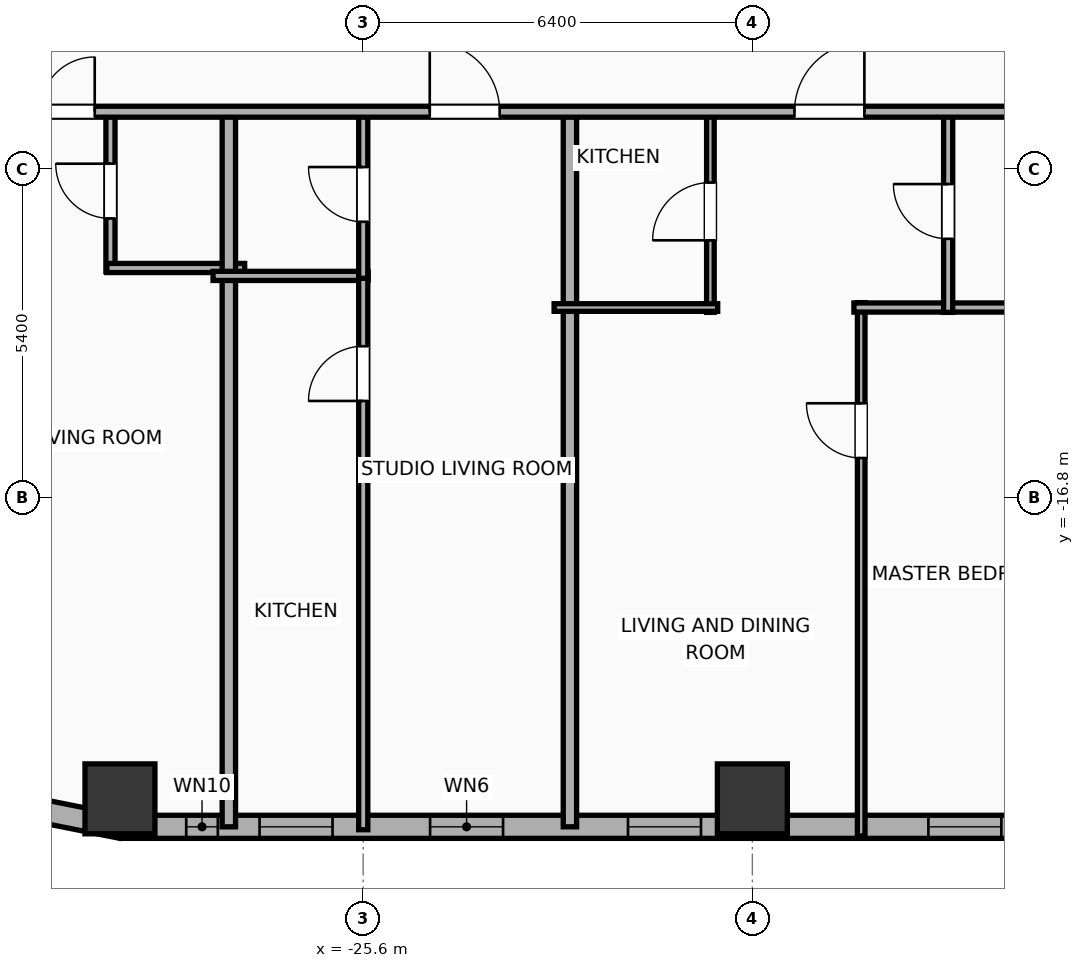
"""IFC4 building model, lengths in metres.
Left out: names, types, materials, properties, quantities, classifications, styles, units other than length and angle.
Written with IfcOpenShell. Run it as: python <this file> out.ifc"""

import sys

from ifc_helpers import new_model, si_unit, direction, frame, frame_2d, origin, origin_2d, place, context, subcontext, project, spatial, rectangle, hollow_rectangle, extrude, element, fill, save


model = new_model("IFC4")
c1 = context("Model", 3, precision=1e-05, world=origin(), true_north=direction((0.0, 1.0)))
c2 = subcontext(c1, "Body", "Model", "MODEL_VIEW")
j1 = project(units=[si_unit("LENGTHUNIT", "METRE"), si_unit("PLANEANGLEUNIT", "RADIAN")], contexts=[c1])
p1 = place(None, origin())
s1 = spatial("IfcSite", under=j1, at=p1, CompositionType="ELEMENT")
p2 = place(p1, origin())
s2 = spatial("IfcBuilding", under=s1, at=p2, CompositionType="ELEMENT")
p3 = place(p2, frame((0.0, 0.0, 72.8)))
s3 = spatial("IfcBuildingStorey", under=s2, at=p3, CompositionType="ELEMENT", Elevation=72.8)
for number, where, z_axis, x_axis in (
    (1, (-29.6, -21.75, 0.0), (0.0, 0.0, 1.0), (1.0, 0.0, 0.0)),
    (2, (-19.2, -21.75, 0.0), (0.0, 0.0, 1.0), (1.0, 0.0, 0.0)),
):
    element("IfcColumn", number, at=place(p3, frame(where, z_axis=z_axis, x_axis=x_axis)), inside=s3, PredefinedType="COLUMN", context=c2, shape_type="SweptSolid", body=[
        extrude(hollow_rectangle(XDim=1.15, YDim=1.15, WallThickness=0.04, at=origin_2d()), origin(), (0.0, 0.0, 1.0), 3.9),
    ])
p4 = place(p3, frame((22.381, -22.21, 0.0), z_axis=(0.0, 0.0, 1.0), x_axis=(-1.0, 0.0, 0.0)))
e3 = element("IfcWall", 3, at=p4, inside=s3, PredefinedType="ELEMENTEDWALL", context=c2, shape_type="SweptSolid", body=[
    extrude(rectangle(XDim=51.963, YDim=0.38, at=frame_2d((25.981, 0.0))), origin(), (0.0, 0.0, 1.0), 3.65),
])
p5 = place(p4, frame((50.372, 0.0, 0.75)))
e4 = element("IfcOpeningElement", 4, at=p5, cuts=e3, PredefinedType="OPENING", context=c2, shape_type="SweptSolid", body=[
    extrude(rectangle(XDim=0.52, YDim=2.05, at=frame_2d((0.26, 1.025))), frame((0.0, 0.2, 0.0), z_axis=(0.0, -1.0, 0.0), x_axis=(1.0, 0.0, 0.0)), (0.0, 0.0, 1.0), 0.4),
])
p6 = place(p4, frame((45.681, 0.0, 0.75)))
e5 = element("IfcOpeningElement", 5, at=p6, cuts=e3, PredefinedType="OPENING", context=c2, shape_type="SweptSolid", body=[
    extrude(rectangle(XDim=1.2, YDim=2.05, at=frame_2d((0.6, 1.025))), frame((0.0, 0.2, 0.0), z_axis=(0.0, -1.0, 0.0), x_axis=(1.0, 0.0, 0.0)), (0.0, 0.0, 1.0), 0.4),
])
p7 = place(p4, frame((48.485, 0.0, 0.75)))
e6 = element("IfcOpeningElement", 6, at=p7, cuts=e3, PredefinedType="OPENING", context=c2, shape_type="SweptSolid", body=[
    extrude(rectangle(XDim=1.2, YDim=2.05, at=frame_2d((0.6, 1.025))), frame((0.0, 0.2, 0.0), z_axis=(0.0, -1.0, 0.0), x_axis=(1.0, 0.0, 0.0)), (0.0, 0.0, 1.0), 0.4),
])
p8 = place(p4, frame((42.426, 0.0, 0.75)))
e7 = element("IfcOpeningElement", 7, at=p8, cuts=e3, PredefinedType="OPENING", context=c2, shape_type="SweptSolid", body=[
    extrude(rectangle(XDim=1.2, YDim=2.05, at=frame_2d((0.6, 1.025))), frame((0.0, 0.2, 0.0), z_axis=(0.0, -1.0, 0.0), x_axis=(1.0, 0.0, 0.0)), (0.0, 0.0, 1.0), 0.4),
])
p9 = place(p4, frame((37.486, 0.0, 0.75)))
e8 = element("IfcOpeningElement", 8, at=p9, cuts=e3, PredefinedType="OPENING", context=c2, shape_type="SweptSolid", body=[
    extrude(rectangle(XDim=1.2, YDim=2.05, at=frame_2d((0.6, 1.025))), frame((0.0, 0.2, 0.0), z_axis=(0.0, -1.0, 0.0), x_axis=(1.0, 0.0, 0.0)), (0.0, 0.0, 1.0), 0.4),
])
p10 = place(p4, frame((33.386, 0.0, 0.75)))
e9 = element("IfcOpeningElement", 9, at=p10, cuts=e3, PredefinedType="OPENING", context=c2, shape_type="SweptSolid", body=[
    extrude(rectangle(XDim=1.2, YDim=2.05, at=frame_2d((0.6, 1.025))), frame((0.0, 0.2, 0.0), z_axis=(0.0, -1.0, 0.0), x_axis=(1.0, 0.0, 0.0)), (0.0, 0.0, 1.0), 0.4),
])
p11 = place(p4, frame((29.166, 0.0, 0.75)))
e10 = element("IfcOpeningElement", 10, at=p11, cuts=e3, PredefinedType="OPENING", context=c2, shape_type="SweptSolid", body=[
    extrude(rectangle(XDim=1.2, YDim=2.05, at=frame_2d((0.6, 1.025))), frame((0.0, 0.2, 0.0), z_axis=(0.0, -1.0, 0.0), x_axis=(1.0, 0.0, 0.0)), (0.0, 0.0, 1.0), 0.4),
])
p12 = place(p4, frame((26.081, 0.0, 0.75)))
e11 = element("IfcOpeningElement", 11, at=p12, cuts=e3, PredefinedType="OPENING", context=c2, shape_type="SweptSolid", body=[
    extrude(rectangle(XDim=1.2, YDim=2.05, at=frame_2d((0.6, 1.025))), frame((0.0, 0.2, 0.0), z_axis=(0.0, -1.0, 0.0), x_axis=(1.0, 0.0, 0.0)), (0.0, 0.0, 1.0), 0.4),
])
p13 = place(p4, frame((21.981, 0.0, 0.75)))
e12 = element("IfcOpeningElement", 12, at=p13, cuts=e3, PredefinedType="OPENING", context=c2, shape_type="SweptSolid", body=[
    extrude(rectangle(XDim=1.2, YDim=2.05, at=frame_2d((0.6, 1.025))), frame((0.0, 0.2, 0.0), z_axis=(0.0, -1.0, 0.0), x_axis=(1.0, 0.0, 0.0)), (0.0, 0.0, 1.0), 0.4),
])
p14 = place(p4, frame((16.986, 0.0, 0.75)))
e13 = element("IfcOpeningElement", 13, at=p14, cuts=e3, PredefinedType="OPENING", context=c2, shape_type="SweptSolid", body=[
    extrude(rectangle(XDim=1.2, YDim=2.05, at=frame_2d((0.6, 1.025))), frame((0.0, 0.2, 0.0), z_axis=(0.0, -1.0, 0.0), x_axis=(1.0, 0.0, 0.0)), (0.0, 0.0, 1.0), 0.4),
])
p15 = place(p4, frame((12.886, 0.0, 0.75)))
e14 = element("IfcOpeningElement", 14, at=p15, cuts=e3, PredefinedType="OPENING", context=c2, shape_type="SweptSolid", body=[
    extrude(rectangle(XDim=1.2, YDim=2.05, at=frame_2d((0.6, 1.025))), frame((0.0, 0.2, 0.0), z_axis=(0.0, -1.0, 0.0), x_axis=(1.0, 0.0, 0.0)), (0.0, 0.0, 1.0), 0.4),
])
p16 = place(p4, frame((8.306, 0.0, 0.75)))
e15 = element("IfcOpeningElement", 15, at=p16, cuts=e3, PredefinedType="OPENING", context=c2, shape_type="SweptSolid", body=[
    extrude(rectangle(XDim=1.2, YDim=2.05, at=frame_2d((0.6, 1.025))), frame((0.0, 0.2, 0.0), z_axis=(0.0, -1.0, 0.0), x_axis=(1.0, 0.0, 0.0)), (0.0, 0.0, 1.0), 0.4),
])
p17 = place(p4, frame((4.686, 0.0, 0.75)))
e16 = element("IfcOpeningElement", 16, at=p17, cuts=e3, PredefinedType="OPENING", context=c2, shape_type="SweptSolid", body=[
    extrude(rectangle(XDim=1.2, YDim=2.05, at=frame_2d((0.6, 1.025))), frame((0.0, 0.2, 0.0), z_axis=(0.0, -1.0, 0.0), x_axis=(1.0, 0.0, 0.0)), (0.0, 0.0, 1.0), 0.4),
])
p18 = place(p4, frame((1.635, 0.0, 0.75)))
e17 = element("IfcOpeningElement", 17, at=p18, cuts=e3, PredefinedType="OPENING", context=c2, shape_type="SweptSolid", body=[
    extrude(rectangle(XDim=1.2, YDim=2.05, at=frame_2d((0.6, 1.025))), frame((0.0, 0.2, 0.0), z_axis=(0.0, -1.0, 0.0), x_axis=(1.0, 0.0, 0.0)), (0.0, 0.0, 1.0), 0.4),
])
p19 = place(p3, frame((-29.581, -22.21, 0.0), z_axis=(0.0, 0.0, 1.0), x_axis=(-0.980786132421, 0.195086038585, 0.0)))
e18 = element("IfcWall", 18, at=p19, inside=s3, PredefinedType="ELEMENTEDWALL", context=c2, shape_type="SweptSolid", body=[
    extrude(rectangle(XDim=1.504, YDim=0.38, at=frame_2d((0.752, 0.0))), origin(), (0.0, 0.0, 1.0), 3.65),
])
p20 = place(p3, frame((-29.756, -13.08, 0.0), z_axis=(0.0, 0.0, 1.0), x_axis=(0.0, 1.0, 0.0)))
e19 = element("IfcWall", 19, at=p20, inside=s3, PredefinedType="PLUMBINGWALL", context=c2, shape_type="SweptSolid", body=[
    extrude(rectangle(XDim=2.65, YDim=0.15, at=frame_2d((1.325, 0.0))), origin(), (0.0, 0.0, 1.0), 3.65),
])
p21 = place(p20, frame((0.875, 0.0, 0.0)))
e20 = element("IfcOpeningElement", 20, at=p21, cuts=e19, PredefinedType="OPENING", context=c2, shape_type="SweptSolid", body=[
    extrude(rectangle(XDim=0.9, YDim=2.05, at=frame_2d((0.45, 1.025))), frame((0.0, 0.085, 0.0), z_axis=(0.0, -1.0, 0.0), x_axis=(1.0, 0.0, 0.0)), (0.0, 0.0, 1.0), 0.17),
])
p22 = place(p3, frame((-29.816, -13.02, 0.0), z_axis=(0.0, 0.0, 1.0), x_axis=(1.0, 0.0, 0.0)))
e21 = element("IfcWall", 21, at=p22, inside=s3, PredefinedType="PLUMBINGWALL", context=c2, shape_type="SweptSolid", body=[
    extrude(rectangle(XDim=2.267, YDim=0.15, at=frame_2d((1.133, 0.0))), origin(), (0.0, 0.0, 1.0), 3.65),
])
p23 = place(p3, frame((-27.809, -22.21, 0.0), z_axis=(0.0, 0.0, 1.0), x_axis=(0.0, 1.0, 0.0)))
e22 = element("IfcWall", 22, at=p23, inside=s3, PredefinedType="PARTITIONING", context=c2, shape_type="SweptSolid", body=[
    extrude(rectangle(XDim=11.84, YDim=0.22, at=frame_2d((5.92, 0.0))), origin(), (0.0, 0.0, 1.0), 3.65),
])
p24 = place(p3, frame((-28.069, -13.15, 0.0), z_axis=(0.0, 0.0, 1.0), x_axis=(1.0, 0.0, 0.0)))
e23 = element("IfcWall", 23, at=p24, inside=s3, PredefinedType="PLUMBINGWALL", context=c2, shape_type="SweptSolid", body=[
    extrude(rectangle(XDim=2.55, YDim=0.15, at=frame_2d((1.275, 0.0))), origin(), (0.0, 0.0, 1.0), 3.65),
])
p25 = place(p3, frame((-25.599, -22.258, 0.0), z_axis=(0.0, 0.0, 1.0), x_axis=(0.0, 1.0, 0.0)))
e24 = element("IfcWall", 24, at=p25, inside=s3, PredefinedType="PLUMBINGWALL", context=c2, shape_type="SweptSolid", body=[
    extrude(rectangle(XDim=9.147, YDim=0.15, at=frame_2d((4.574, 0.0))), origin(), (0.0, 0.0, 1.0), 3.65),
])
p26 = place(p25, frame((7.051, 0.0, 0.0)))
e25 = element("IfcOpeningElement", 25, at=p26, cuts=e24, PredefinedType="OPENING", context=c2, shape_type="SweptSolid", body=[
    extrude(rectangle(XDim=0.9, YDim=2.05, at=frame_2d((0.45, 1.025))), frame((0.0, 0.085, 0.0), z_axis=(0.0, -1.0, 0.0), x_axis=(1.0, 0.0, 0.0)), (0.0, 0.0, 1.0), 0.17),
])
p27 = place(p3, frame((-25.599, -13.19, 0.0), z_axis=(0.0, 0.0, 1.0), x_axis=(0.0, 1.0, 0.0)))
e26 = element("IfcWall", 26, at=p27, inside=s3, PredefinedType="PLUMBINGWALL", context=c2, shape_type="SweptSolid", body=[
    extrude(rectangle(XDim=2.76, YDim=0.15, at=frame_2d((1.38, 0.0))), origin(), (0.0, 0.0, 1.0), 3.65),
])
p28 = place(p27, frame((0.93, 0.0, 0.0)))
e27 = element("IfcOpeningElement", 27, at=p28, cuts=e26, PredefinedType="OPENING", context=c2, shape_type="SweptSolid", body=[
    extrude(rectangle(XDim=0.9, YDim=2.05, at=frame_2d((0.45, 1.025))), frame((0.0, 0.085, 0.0), z_axis=(0.0, -1.0, 0.0), x_axis=(1.0, 0.0, 0.0)), (0.0, 0.0, 1.0), 0.17),
])
p29 = place(p3, frame((-22.2, -22.21, 0.0), z_axis=(0.0, 0.0, 1.0), x_axis=(0.0, 1.0, 0.0)))
e28 = element("IfcWall", 28, at=p29, inside=s3, PredefinedType="PARTITIONING", context=c2, shape_type="SweptSolid", body=[
    extrude(rectangle(XDim=11.84, YDim=0.22, at=frame_2d((5.92, 0.0))), origin(), (0.0, 0.0, 1.0), 3.65),
])
p30 = place(p3, frame((-17.41, -22.36, 0.0), z_axis=(0.0, 0.0, 1.0), x_axis=(0.0, 1.0, 0.0)))
e29 = element("IfcWall", 29, at=p30, inside=s3, PredefinedType="PARTITIONING", context=c2, shape_type="SweptSolid", body=[
    extrude(rectangle(XDim=8.77, YDim=0.125, at=frame_2d((4.385, 0.0))), origin(), (0.0, 0.0, 1.0), 3.65),
])
p31 = place(p30, frame((6.215, 0.0, 0.0)))
e30 = element("IfcOpeningElement", 30, at=p31, cuts=e29, PredefinedType="OPENING", context=c2, shape_type="SweptSolid", body=[
    extrude(rectangle(XDim=0.9, YDim=2.05, at=frame_2d((0.45, 1.025))), frame((0.0, 0.073, 0.0), z_axis=(0.0, -1.0, 0.0), x_axis=(1.0, 0.0, 0.0)), (0.0, 0.0, 1.0), 0.145),
])
p32 = place(p3, frame((-17.53, -13.67, 0.0), z_axis=(0.0, 0.0, 1.0), x_axis=(1.0, 0.0, 0.0)))
e31 = element("IfcWall", 31, at=p32, inside=s3, PredefinedType="PLUMBINGWALL", context=c2, shape_type="SweptSolid", body=[
    extrude(rectangle(XDim=3.605, YDim=0.15, at=frame_2d((1.802, 0.0))), origin(), (0.0, 0.0, 1.0), 3.65),
])
p33 = place(p3, frame((-19.89, -13.75, 0.0), z_axis=(0.0, 0.0, 1.0), x_axis=(0.0, 1.0, 0.0)))
e32 = element("IfcWall", 32, at=p33, inside=s3, PredefinedType="PARTITIONING", context=c2, shape_type="SweptSolid", body=[
    extrude(rectangle(XDim=3.32, YDim=0.125, at=frame_2d((1.66, 0.0))), origin(), (0.0, 0.0, 1.0), 3.65),
])
p34 = place(p33, frame((1.185, 0.0, 0.0)))
e33 = element("IfcOpeningElement", 33, at=p34, cuts=e32, PredefinedType="OPENING", context=c2, shape_type="SweptSolid", body=[
    extrude(rectangle(XDim=0.95, YDim=2.05, at=frame_2d((0.475, 1.025))), frame((0.0, 0.073, 0.0), z_axis=(0.0, -1.0, 0.0), x_axis=(1.0, 0.0, 0.0)), (0.0, 0.0, 1.0), 0.145),
])
p35 = place(p3, frame((-22.46, -13.67, 0.0), z_axis=(0.0, 0.0, 1.0), x_axis=(1.0, 0.0, 0.0)))
e34 = element("IfcWall", 34, at=p35, inside=s3, PredefinedType="PARTITIONING", context=c2, shape_type="SweptSolid", body=[
    extrude(rectangle(XDim=2.69, YDim=0.125, at=frame_2d((1.345, 0.0))), origin(), (0.0, 0.0, 1.0), 3.65),
])
p36 = place(p3, frame((-15.98, -13.75, 0.0), z_axis=(0.0, 0.0, 1.0), x_axis=(0.0, 1.0, 0.0)))
e35 = element("IfcWall", 35, at=p36, inside=s3, PredefinedType="PLUMBINGWALL", context=c2, shape_type="SweptSolid", body=[
    extrude(rectangle(XDim=3.32, YDim=0.15, at=frame_2d((1.66, 0.0))), origin(), (0.0, 0.0, 1.0), 3.65),
])
p37 = place(p36, frame((1.21, 0.0, 0.0)))
e36 = element("IfcOpeningElement", 36, at=p37, cuts=e35, PredefinedType="OPENING", context=c2, shape_type="SweptSolid", body=[
    extrude(rectangle(XDim=0.9, YDim=2.05, at=frame_2d((0.45, 1.025))), frame((0.0, 0.085, 0.0), z_axis=(0.0, -1.0, 0.0), x_axis=(1.0, 0.0, 0.0)), (0.0, 0.0, 1.0), 0.17),
])
p38 = place(p3, frame((-33.41, -10.45, 0.0), z_axis=(0.0, 0.0, 1.0), x_axis=(1.0, 0.0, 0.0)))
e37 = element("IfcWall", 37, at=p38, inside=s3, PredefinedType="PARTITIONING", context=c2, shape_type="SweptSolid", body=[
    extrude(rectangle(XDim=59.62, YDim=0.18, at=frame_2d((29.81, 0.0))), origin(), (0.0, 0.0, 1.0), 3.65),
])
p39 = place(p38, frame((2.495, 0.0, 0.0)))
e38 = element("IfcOpeningElement", 38, at=p39, cuts=e37, PredefinedType="OPENING", context=c2, shape_type="SweptSolid", body=[
    extrude(rectangle(XDim=0.9, YDim=2.05, at=frame_2d((0.45, 1.025))), frame((0.0, 0.1, 0.0), z_axis=(0.0, -1.0, 0.0), x_axis=(1.0, 0.0, 0.0)), (0.0, 0.0, 1.0), 0.2),
])
p40 = place(p38, frame((8.905, 0.0, 0.0)))
e39 = element("IfcOpeningElement", 39, at=p40, cuts=e37, PredefinedType="OPENING", context=c2, shape_type="SweptSolid", body=[
    extrude(rectangle(XDim=1.15, YDim=2.05, at=frame_2d((0.575, 1.025))), frame((0.0, 0.1, 0.0), z_axis=(0.0, -1.0, 0.0), x_axis=(1.0, 0.0, 0.0)), (0.0, 0.0, 1.0), 0.2),
])
p41 = place(p38, frame((14.902, 0.0, 0.0)))
e40 = element("IfcOpeningElement", 40, at=p41, cuts=e37, PredefinedType="OPENING", context=c2, shape_type="SweptSolid", body=[
    extrude(rectangle(XDim=1.15, YDim=2.05, at=frame_2d((0.575, 1.025))), frame((0.0, 0.1, 0.0), z_axis=(0.0, -1.0, 0.0), x_axis=(1.0, 0.0, 0.0)), (0.0, 0.0, 1.0), 0.2),
])
p42 = place(p38, frame((23.112, 0.0, 0.0)))
e41 = element("IfcOpeningElement", 41, at=p42, cuts=e37, PredefinedType="OPENING", context=c2, shape_type="SweptSolid", body=[
    extrude(rectangle(XDim=1.15, YDim=2.05, at=frame_2d((0.575, 1.025))), frame((0.0, 0.1, 0.0), z_axis=(0.0, -1.0, 0.0), x_axis=(1.0, 0.0, 0.0)), (0.0, 0.0, 1.0), 0.2),
])
p43 = place(p38, frame((31.572, 0.0, 0.0)))
e42 = element("IfcOpeningElement", 42, at=p43, cuts=e37, PredefinedType="OPENING", context=c2, shape_type="SweptSolid", body=[
    extrude(rectangle(XDim=0.9, YDim=2.05, at=frame_2d((0.45, 1.025))), frame((0.0, 0.1, 0.0), z_axis=(0.0, -1.0, 0.0), x_axis=(1.0, 0.0, 0.0)), (0.0, 0.0, 1.0), 0.2),
])
p44 = place(p38, frame((39.502, 0.0, 0.0)))
e43 = element("IfcOpeningElement", 43, at=p44, cuts=e37, PredefinedType="OPENING", context=c2, shape_type="SweptSolid", body=[
    extrude(rectangle(XDim=1.15, YDim=2.05, at=frame_2d((0.575, 1.025))), frame((0.0, 0.1, 0.0), z_axis=(0.0, -1.0, 0.0), x_axis=(1.0, 0.0, 0.0)), (0.0, 0.0, 1.0), 0.2),
])
p45 = place(p38, frame((47.699, 0.0, 0.0)))
e44 = element("IfcOpeningElement", 44, at=p45, cuts=e37, PredefinedType="OPENING", context=c2, shape_type="SweptSolid", body=[
    extrude(rectangle(XDim=1.15, YDim=2.05, at=frame_2d((0.575, 1.025))), frame((0.0, 0.1, 0.0), z_axis=(0.0, -1.0, 0.0), x_axis=(1.0, 0.0, 0.0)), (0.0, 0.0, 1.0), 0.2),
])
p46 = place(p38, frame((55.539, 0.0, 0.0)))
e45 = element("IfcOpeningElement", 45, at=p46, cuts=e37, PredefinedType="OPENING", context=c2, shape_type="SweptSolid", body=[
    extrude(rectangle(XDim=1.15, YDim=2.05, at=frame_2d((0.575, 1.025))), frame((0.0, 0.1, 0.0), z_axis=(0.0, -1.0, 0.0), x_axis=(1.0, 0.0, 0.0)), (0.0, 0.0, 1.0), 0.2),
])
p47 = place(p5, origin())
e46 = element("IfcWindow", 46, at=p47, inside=s3, PartitioningType="SINGLE_PANEL", PredefinedType="WINDOW", context=c2, shape_type="SweptSolid", body=[
    extrude(rectangle(XDim=0.52, YDim=2.05, at=frame_2d((0.26, 1.025))), frame((0.0, 0.03, 0.0), z_axis=(0.0, -1.0, 0.0), x_axis=(1.0, 0.0, 0.0)), (0.0, 0.0, 1.0), 0.06),
])
fill(e4, e46)
p48 = place(p6, origin())
e47 = element("IfcWindow", 47, at=p48, inside=s3, PartitioningType="SINGLE_PANEL", PredefinedType="WINDOW", context=c2, shape_type="SweptSolid", body=[
    extrude(rectangle(XDim=1.2, YDim=2.05, at=frame_2d((0.6, 1.025))), frame((0.0, 0.03, 0.0), z_axis=(0.0, -1.0, 0.0), x_axis=(1.0, 0.0, 0.0)), (0.0, 0.0, 1.0), 0.06),
])
fill(e5, e47)
p49 = place(p7, origin())
e48 = element("IfcWindow", 48, at=p49, inside=s3, PartitioningType="SINGLE_PANEL", PredefinedType="WINDOW", context=c2, shape_type="SweptSolid", body=[
    extrude(rectangle(XDim=1.2, YDim=2.05, at=frame_2d((0.6, 1.025))), frame((0.0, 0.03, 0.0), z_axis=(0.0, -1.0, 0.0), x_axis=(1.0, 0.0, 0.0)), (0.0, 0.0, 1.0), 0.06),
])
fill(e6, e48)
p50 = place(p8, origin())
e49 = element("IfcWindow", 49, at=p50, inside=s3, PartitioningType="SINGLE_PANEL", PredefinedType="WINDOW", context=c2, shape_type="SweptSolid", body=[
    extrude(rectangle(XDim=1.2, YDim=2.05, at=frame_2d((0.6, 1.025))), frame((0.0, 0.03, 0.0), z_axis=(0.0, -1.0, 0.0), x_axis=(1.0, 0.0, 0.0)), (0.0, 0.0, 1.0), 0.06),
])
fill(e7, e49)
p51 = place(p9, origin())
e50 = element("IfcWindow", 50, at=p51, inside=s3, PartitioningType="SINGLE_PANEL", PredefinedType="WINDOW", context=c2, shape_type="SweptSolid", body=[
    extrude(rectangle(XDim=1.2, YDim=2.05, at=frame_2d((0.6, 1.025))), frame((0.0, 0.03, 0.0), z_axis=(0.0, -1.0, 0.0), x_axis=(1.0, 0.0, 0.0)), (0.0, 0.0, 1.0), 0.06),
])
fill(e8, e50)
p52 = place(p21, origin())
e51 = element("IfcDoor", 51, at=p52, inside=s3, OperationType="SINGLE_SWING_RIGHT", PredefinedType="DOOR", context=c2, shape_type="SweptSolid", body=[
    extrude(rectangle(XDim=0.9, YDim=2.05, at=frame_2d((0.45, 1.025))), frame((0.0, 0.025, 0.0), z_axis=(0.0, -1.0, 0.0), x_axis=(1.0, 0.0, 0.0)), (0.0, 0.0, 1.0), 0.05),
])
fill(e20, e51)
p53 = place(p26, origin())
e52 = element("IfcDoor", 52, at=p53, inside=s3, OperationType="SINGLE_SWING_LEFT", PredefinedType="DOOR", context=c2, shape_type="SweptSolid", body=[
    extrude(rectangle(XDim=0.9, YDim=2.05, at=frame_2d((0.45, 1.025))), frame((0.0, 0.025, 0.0), z_axis=(0.0, -1.0, 0.0), x_axis=(1.0, 0.0, 0.0)), (0.0, 0.0, 1.0), 0.05),
])
fill(e25, e52)
p54 = place(p28, origin())
e53 = element("IfcDoor", 53, at=p54, inside=s3, OperationType="SINGLE_SWING_RIGHT", PredefinedType="DOOR", context=c2, shape_type="SweptSolid", body=[
    extrude(rectangle(XDim=0.9, YDim=2.05, at=frame_2d((0.45, 1.025))), frame((0.0, 0.025, 0.0), z_axis=(0.0, -1.0, 0.0), x_axis=(1.0, 0.0, 0.0)), (0.0, 0.0, 1.0), 0.05),
])
fill(e27, e53)
p55 = place(p31, origin())
e54 = element("IfcDoor", 54, at=p55, inside=s3, OperationType="SINGLE_SWING_RIGHT", PredefinedType="DOOR", context=c2, shape_type="SweptSolid", body=[
    extrude(rectangle(XDim=0.9, YDim=2.05, at=frame_2d((0.45, 1.025))), frame((0.0, 0.025, 0.0), z_axis=(0.0, -1.0, 0.0), x_axis=(1.0, 0.0, 0.0)), (0.0, 0.0, 1.0), 0.05),
])
fill(e30, e54)
p56 = place(p34, origin())
e55 = element("IfcDoor", 55, at=p56, inside=s3, OperationType="SINGLE_SWING_LEFT", PredefinedType="DOOR", context=c2, shape_type="SweptSolid", body=[
    extrude(rectangle(XDim=0.95, YDim=2.05, at=frame_2d((0.475, 1.025))), frame((0.0, 0.025, 0.0), z_axis=(0.0, -1.0, 0.0), x_axis=(1.0, 0.0, 0.0)), (0.0, 0.0, 1.0), 0.05),
])
fill(e33, e55)
p57 = place(p37, origin())
e56 = element("IfcDoor", 56, at=p57, inside=s3, OperationType="SINGLE_SWING_RIGHT", PredefinedType="DOOR", context=c2, shape_type="SweptSolid", body=[
    extrude(rectangle(XDim=0.9, YDim=2.05, at=frame_2d((0.45, 1.025))), frame((0.0, 0.025, 0.0), z_axis=(0.0, -1.0, 0.0), x_axis=(1.0, 0.0, 0.0)), (0.0, 0.0, 1.0), 0.05),
])
fill(e36, e56)
p58 = place(p39, origin())
e57 = element("IfcDoor", 57, at=p58, inside=s3, OperationType="SINGLE_SWING_RIGHT", PredefinedType="DOOR", context=c2, shape_type="SweptSolid", body=[
    extrude(rectangle(XDim=0.9, YDim=2.05, at=frame_2d((0.45, 1.025))), frame((0.0, 0.025, 0.0), z_axis=(0.0, -1.0, 0.0), x_axis=(1.0, 0.0, 0.0)), (0.0, 0.0, 1.0), 0.05),
])
fill(e38, e57)
p59 = place(p40, origin())
e58 = element("IfcDoor", 58, at=p59, inside=s3, OperationType="SINGLE_SWING_LEFT", PredefinedType="DOOR", context=c2, shape_type="SweptSolid", body=[
    extrude(rectangle(XDim=1.15, YDim=2.05, at=frame_2d((0.575, 1.025))), frame((0.0, 0.025, 0.0), z_axis=(0.0, -1.0, 0.0), x_axis=(1.0, 0.0, 0.0)), (0.0, 0.0, 1.0), 0.05),
])
fill(e39, e58)
p60 = place(p41, origin())
e59 = element("IfcDoor", 59, at=p60, inside=s3, OperationType="SINGLE_SWING_RIGHT", PredefinedType="DOOR", context=c2, shape_type="SweptSolid", body=[
    extrude(rectangle(XDim=1.15, YDim=2.05, at=frame_2d((0.575, 1.025))), frame((0.0, 0.025, 0.0), z_axis=(0.0, -1.0, 0.0), x_axis=(1.0, 0.0, 0.0)), (0.0, 0.0, 1.0), 0.05),
])
fill(e40, e59)
save(model, sys.argv[1])
